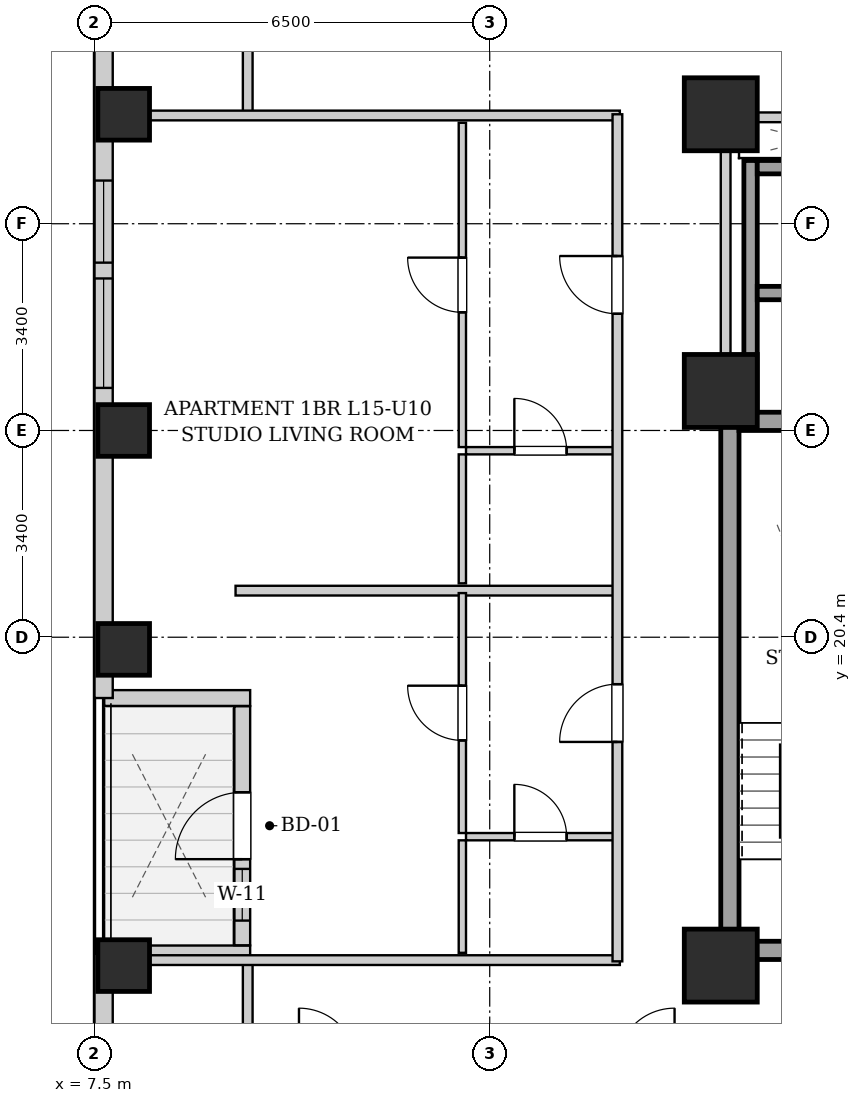
"""IFC4 building model, lengths in metres.
Left out: names, types, materials, properties, quantities, classifications, styles, units other than length and angle.
Written with IfcOpenShell. Run it as: python <this file> out.ifc"""

import sys

from ifc_helpers import new_model, si_unit, direction, frame, frame_2d, origin, origin_2d, place, context, subcontext, project, spatial, rectangle, extrude, element, fill, save


model = new_model("IFC4")
c1 = context("Model", 3, precision=1e-05, world=origin(), true_north=direction((0.0, 1.0)))
c2 = subcontext(c1, "Body", "Model", "MODEL_VIEW")
j1 = project(units=[si_unit("LENGTHUNIT", "METRE"), si_unit("PLANEANGLEUNIT", "RADIAN")], contexts=[c1])
p1 = place(None, origin())
s1 = spatial("IfcSite", under=j1, at=p1, CompositionType="ELEMENT")
p2 = place(p1, origin())
s2 = spatial("IfcBuilding", under=s1, at=p2, CompositionType="ELEMENT")
p3 = place(p2, frame((0.0, 0.0, 57.8)))
s3 = spatial("IfcBuildingStorey", under=s2, at=p3, CompositionType="ELEMENT", Elevation=57.8)
for number, where, z_axis, x_axis in (
    (1, (7.98, 15.0, 0.0), (0.0, 0.0, 1.0), (1.0, 0.0, 0.0)),
    (2, (7.98, 20.2, 0.0), (0.0, 0.0, 1.0), (1.0, 0.0, 0.0)),
    (3, (7.98, 23.8, 0.0), (0.0, 0.0, 1.0), (1.0, 0.0, 0.0)),
    (4, (7.98, 29.0, 0.0), (0.0, 0.0, 1.0), (1.0, 0.0, 0.0)),
):
    element("IfcColumn", number, at=place(p3, frame(where, z_axis=z_axis, x_axis=x_axis)), inside=s3, PredefinedType="COLUMN", context=c2, shape_type="SweptSolid", body=[
        extrude(rectangle(XDim=0.85, YDim=0.85, at=origin_2d()), origin(), (0.0, 0.0, 1.0), 3.2),
    ])
for number, where, z_axis, x_axis in (
    (5, (17.8, 15.0, 0.0), (0.0, 0.0, 1.0), (1.0, 0.0, 0.0)),
    (6, (17.8, 29.0, 0.0), (0.0, 0.0, 1.0), (1.0, 0.0, 0.0)),
    (7, (17.8, 24.45, 0.0), (0.0, 0.0, 1.0), (1.0, 0.0, 0.0)),
):
    element("IfcColumn", number, at=place(p3, frame(where, z_axis=z_axis, x_axis=x_axis)), inside=s3, PredefinedType="COLUMN", context=c2, shape_type="SweptSolid", body=[
        extrude(rectangle(XDim=1.2, YDim=1.2, at=origin_2d()), origin(), (0.0, 0.0, 1.0), 3.2),
    ])
p4 = place(p3, frame((7.65, 2.5, 0.0), z_axis=(0.0, 0.0, 1.0), x_axis=(0.0, 1.0, 0.0)))
e8 = element("IfcWall", 8, at=p4, inside=s3, PredefinedType="SOLIDWALL", context=c2, shape_type="SweptSolid", body=[
    extrude(rectangle(XDim=12.7, YDim=0.3, at=frame_2d((6.35, 0.0))), origin(), (0.0, 0.0, 1.0), 1.975),
])
p5 = place(p4, frame((3.257, 0.0, 0.55)))
e9 = element("IfcOpeningElement", 9, at=p5, cuts=e8, PredefinedType="OPENING", context=c2, shape_type="SweptSolid", body=[
    extrude(rectangle(XDim=1.8, YDim=1.2, at=frame_2d((0.9, 0.6))), frame((0.0, 0.16, 0.0), z_axis=(0.0, -1.0, 0.0), x_axis=(1.0, 0.0, 0.0)), (0.0, 0.0, 1.0), 0.32),
])
p6 = place(p4, frame((1.185, 0.0, 0.55)))
e10 = element("IfcOpeningElement", 10, at=p6, cuts=e8, PredefinedType="OPENING", context=c2, shape_type="SweptSolid", body=[
    extrude(rectangle(XDim=1.35, YDim=1.2, at=frame_2d((0.675, 0.6))), frame((0.0, 0.16, 0.0), z_axis=(0.0, -1.0, 0.0), x_axis=(1.0, 0.0, 0.0)), (0.0, 0.0, 1.0), 0.32),
])
p7 = place(p3, frame((7.66, 15.2, 0.0), z_axis=(0.0, 0.0, 1.0), x_axis=(1.0, 0.0, 0.0)))
e11 = element("IfcWall", 11, at=p7, inside=s3, PredefinedType="SOLIDWALL", context=c2, shape_type="SweptSolid", body=[
    extrude(rectangle(XDim=2.4, YDim=0.26, at=frame_2d((1.2, 0.0))), origin(), (0.0, 0.0, 1.0), 2.94),
])
p8 = place(p3, frame((9.93, 15.334, 0.0), z_axis=(0.0, 0.0, 1.0), x_axis=(0.0, 1.0, 0.0)))
e12 = element("IfcWall", 12, at=p8, inside=s3, PredefinedType="SOLIDWALL", context=c2, shape_type="SweptSolid", body=[
    extrude(rectangle(XDim=3.932, YDim=0.26, at=frame_2d((1.966, 0.0))), origin(), (0.0, 0.0, 1.0), 2.94),
])
p9 = place(p8, frame((1.416, 0.0, 0.0)))
e13 = element("IfcOpeningElement", 13, at=p9, cuts=e12, PredefinedType="OPENING", context=c2, shape_type="SweptSolid", body=[
    extrude(rectangle(XDim=1.1, YDim=2.0, at=frame_2d((0.55, 1.0))), frame((0.0, 0.14, 0.0), z_axis=(0.0, -1.0, 0.0), x_axis=(1.0, 0.0, 0.0)), (0.0, 0.0, 1.0), 0.28),
])
p10 = place(p8, frame((0.406, 0.0, 0.55)))
e14 = element("IfcOpeningElement", 14, at=p10, cuts=e12, PredefinedType="OPENING", context=c2, shape_type="SweptSolid", body=[
    extrude(rectangle(XDim=0.85, YDim=1.2, at=frame_2d((0.425, 0.6))), frame((0.0, 0.14, 0.0), z_axis=(0.0, -1.0, 0.0), x_axis=(1.0, 0.0, 0.0)), (0.0, 0.0, 1.0), 0.28),
])
p11 = place(p3, frame((10.06, 19.4, 0.0), z_axis=(0.0, 0.0, 1.0), x_axis=(-1.0, 0.0, 0.0)))
e15 = element("IfcWall", 15, at=p11, inside=s3, PredefinedType="SOLIDWALL", context=c2, shape_type="SweptSolid", body=[
    extrude(rectangle(XDim=2.4, YDim=0.26, at=frame_2d((1.2, 0.0))), origin(), (0.0, 0.0, 1.0), 2.94),
])
p12 = place(p3, frame((7.65, 19.4, 0.0), z_axis=(0.0, 0.0, 1.0), x_axis=(0.0, 1.0, 0.0)))
e16 = element("IfcWall", 16, at=p12, inside=s3, PredefinedType="SOLIDWALL", context=c2, shape_type="SweptSolid", body=[
    extrude(rectangle(XDim=25.7, YDim=0.3, at=frame_2d((12.85, 0.0))), origin(), (0.0, 0.0, 1.0), 1.975),
])
p13 = place(p12, frame((20.185, 0.0, 0.55)))
e17 = element("IfcOpeningElement", 17, at=p13, cuts=e16, PredefinedType="OPENING", context=c2, shape_type="SweptSolid", body=[
    extrude(rectangle(XDim=1.8, YDim=1.2, at=frame_2d((0.9, 0.6))), frame((0.0, 0.16, 0.0), z_axis=(0.0, -1.0, 0.0), x_axis=(1.0, 0.0, 0.0)), (0.0, 0.0, 1.0), 0.32),
])
p14 = place(p12, frame((14.585, 0.0, 0.55)))
e18 = element("IfcOpeningElement", 18, at=p14, cuts=e16, PredefinedType="OPENING", context=c2, shape_type="SweptSolid", body=[
    extrude(rectangle(XDim=1.35, YDim=1.2, at=frame_2d((0.675, 0.6))), frame((0.0, 0.16, 0.0), z_axis=(0.0, -1.0, 0.0), x_axis=(1.0, 0.0, 0.0)), (0.0, 0.0, 1.0), 0.32),
])
p15 = place(p12, frame((5.1, 0.0, 0.55)))
e19 = element("IfcOpeningElement", 19, at=p15, cuts=e16, PredefinedType="OPENING", context=c2, shape_type="SweptSolid", body=[
    extrude(rectangle(XDim=1.8, YDim=1.2, at=frame_2d((0.9, 0.6))), frame((0.0, 0.16, 0.0), z_axis=(0.0, -1.0, 0.0), x_axis=(1.0, 0.0, 0.0)), (0.0, 0.0, 1.0), 0.32),
])
p16 = place(p12, frame((7.16, 0.0, 0.55)))
e20 = element("IfcOpeningElement", 20, at=p16, cuts=e16, PredefinedType="OPENING", context=c2, shape_type="SweptSolid", body=[
    extrude(rectangle(XDim=1.35, YDim=1.2, at=frame_2d((0.675, 0.6))), frame((0.0, 0.16, 0.0), z_axis=(0.0, -1.0, 0.0), x_axis=(1.0, 0.0, 0.0)), (0.0, 0.0, 1.0), 0.32),
])
p17 = place(p3, frame((17.95, 15.1, 0.0), z_axis=(0.0, 0.0, 1.0), x_axis=(0.0, 1.0, 0.0)))
e21 = element("IfcWall", 21, at=p17, inside=s3, PredefinedType="SHEAR", context=c2, shape_type="SweptSolid", body=[
    extrude(rectangle(XDim=9.0, YDim=0.3, at=frame_2d((4.5, 0.0))), origin(), (0.0, 0.0, 1.0), 2.94),
])
p18 = place(p3, frame((18.1, 23.95, 0.0), z_axis=(0.0, 0.0, 1.0), x_axis=(1.0, 0.0, 0.0)))
e22 = element("IfcWall", 22, at=p18, inside=s3, PredefinedType="SHEAR", context=c2, shape_type="SweptSolid", body=[
    extrude(rectangle(XDim=2.85, YDim=0.3, at=frame_2d((1.425, 0.0))), origin(), (0.0, 0.0, 1.0), 2.94),
])
p19 = place(p3, frame((18.1, 15.25, 0.0), z_axis=(0.0, 0.0, 1.0), x_axis=(1.0, 0.0, 0.0)))
e23 = element("IfcWall", 23, at=p19, inside=s3, PredefinedType="SHEAR", context=c2, shape_type="SweptSolid", body=[
    extrude(rectangle(XDim=2.85, YDim=0.3, at=frame_2d((1.425, 0.0))), origin(), (0.0, 0.0, 1.0), 2.94),
])
p20 = place(p19, frame((0.86, 0.0, 0.0)))
e24 = element("IfcOpeningElement", 24, at=p20, cuts=e23, PredefinedType="OPENING", context=c2, shape_type="SweptSolid", body=[
    extrude(rectangle(XDim=1.1, YDim=2.05, at=frame_2d((0.55, 1.025))), frame((0.0, 0.16, 0.0), z_axis=(0.0, -1.0, 0.0), x_axis=(1.0, 0.0, 0.0)), (0.0, 0.0, 1.0), 0.32),
])
p21 = place(p3, frame((18.29, 24.1, 0.0), z_axis=(0.0, 0.0, 1.0), x_axis=(0.0, 1.0, 0.0)))
e25 = element("IfcWall", 25, at=p21, inside=s3, PredefinedType="SHEAR", context=c2, shape_type="SweptSolid", body=[
    extrude(rectangle(XDim=4.14, YDim=0.22, at=frame_2d((2.07, 0.0))), origin(), (0.0, 0.0, 1.0), 2.94),
])
for number, where, z_axis, x_axis in (
    (26, (18.4, 26.06, 0.0), (0.0, 0.0, 1.0), (1.0, 0.0, 0.0)),
    (27, (18.4, 28.13, 0.0), (0.0, 0.0, 1.0), (1.0, 0.0, 0.0)),
):
    element("IfcWall", number, at=place(p3, frame(where, z_axis=z_axis, x_axis=x_axis)), inside=s3, PredefinedType="SHEAR", context=c2, shape_type="SweptSolid", body=[
        extrude(rectangle(XDim=1.9, YDim=0.22, at=frame_2d((0.95, 0.0))), origin(), (0.0, 0.0, 1.0), 2.94),
    ])
p22 = place(p3, frame((17.88, 24.12, 0.0), z_axis=(0.0, 0.0, 1.0), x_axis=(0.0, 1.0, 0.0)))
e28 = element("IfcWall", 28, at=p22, inside=s3, PredefinedType="PARTITIONING", context=c2, shape_type="SweptSolid", body=[
    extrude(rectangle(XDim=4.76, YDim=0.16, at=frame_2d((2.38, 0.0))), origin(), (0.0, 0.0, 1.0), 2.275),
])
p23 = place(p3, frame((17.96, 28.95, 0.0), z_axis=(0.0, 0.0, 1.0), x_axis=(1.0, 0.0, 0.0)))
e29 = element("IfcWall", 29, at=p23, inside=s3, PredefinedType="PARTITIONING", context=c2, shape_type="SweptSolid", body=[
    extrude(rectangle(XDim=4.29, YDim=0.16, at=frame_2d((2.145, 0.0))), origin(), (0.0, 0.0, 1.0), 2.232),
])
p24 = place(p23, frame((1.57, 0.0, 0.0)))
e30 = element("IfcOpeningElement", 30, at=p24, cuts=e29, PredefinedType="OPENING", context=c2, shape_type="SweptSolid", body=[
    extrude(rectangle(XDim=0.86, YDim=2.05, at=frame_2d((0.43, 1.025))), frame((0.0, 0.09, 0.0), z_axis=(0.0, -1.0, 0.0), x_axis=(1.0, 0.0, 0.0)), (0.0, 0.0, 1.0), 0.18),
])
for number, where, z_axis, x_axis in (
    (31, (10.02, 13.35, 0.0), (0.0, 0.0, 1.0), (0.0, 1.0, 0.0)),
    (32, (10.02, 28.98, 0.0), (0.0, 0.0, 1.0), (0.0, 1.0, 0.0)),
):
    element("IfcWall", number, at=place(p3, frame(where, z_axis=z_axis, x_axis=x_axis)), inside=s3, PredefinedType="PARTITIONING", context=c2, shape_type="SweptSolid", body=[
        extrude(rectangle(XDim=1.74, YDim=0.16, at=frame_2d((0.87, 0.0))), origin(), (0.0, 0.0, 1.0), 2.94),
    ])
for number, where, z_axis, x_axis in (
    (33, (7.78, 15.09, 0.0), (0.0, 0.0, 1.0), (1.0, 0.0, 0.0)),
    (34, (7.78, 28.98, 0.0), (0.0, 0.0, 1.0), (1.0, 0.0, 0.0)),
):
    element("IfcWall", number, at=place(p3, frame(where, z_axis=z_axis, x_axis=x_axis)), inside=s3, PredefinedType="PARTITIONING", context=c2, shape_type="SweptSolid", body=[
        extrude(rectangle(XDim=8.36, YDim=0.16, at=frame_2d((4.18, 0.0))), origin(), (0.0, 0.0, 1.0), 2.232),
    ])
p25 = place(p3, frame((9.82, 21.166, 0.0), z_axis=(0.0, 0.0, 1.0), x_axis=(1.0, 0.0, 0.0)))
e35 = element("IfcWall", 35, at=p25, inside=s3, PredefinedType="PARTITIONING", context=c2, shape_type="SweptSolid", body=[
    extrude(rectangle(XDim=6.24, YDim=0.16, at=frame_2d((3.12, 0.0))), origin(), (0.0, 0.0, 1.0), 2.94),
])
p26 = place(p3, frame((13.61, 17.12, 0.0), z_axis=(0.0, 0.0, 1.0), x_axis=(1.0, 0.0, 0.0)))
e36 = element("IfcWall", 36, at=p26, inside=s3, PredefinedType="PARTITIONING", context=c2, shape_type="SweptSolid", body=[
    extrude(rectangle(XDim=2.45, YDim=0.12, at=frame_2d((1.225, 0.0))), origin(), (0.0, 0.0, 1.0), 2.94),
])
p27 = place(p26, frame((0.795, 0.0, 0.0)))
e37 = element("IfcOpeningElement", 37, at=p27, cuts=e36, PredefinedType="OPENING", context=c2, shape_type="SweptSolid", body=[
    extrude(rectangle(XDim=0.86, YDim=2.05, at=frame_2d((0.43, 1.025))), frame((0.0, 0.07, 0.0), z_axis=(0.0, -1.0, 0.0), x_axis=(1.0, 0.0, 0.0)), (0.0, 0.0, 1.0), 0.14),
])
p28 = place(p3, frame((13.55, 15.21, 0.0), z_axis=(0.0, 0.0, 1.0), x_axis=(0.0, 1.0, 0.0)))
e38 = element("IfcWall", 38, at=p28, inside=s3, PredefinedType="PARTITIONING", context=c2, shape_type="SweptSolid", body=[
    extrude(rectangle(XDim=1.85, YDim=0.12, at=frame_2d((0.925, 0.0))), origin(), (0.0, 0.0, 1.0), 2.94),
])
p29 = place(p3, frame((13.55, 17.18, 0.0), z_axis=(0.0, 0.0, 1.0), x_axis=(0.0, 1.0, 0.0)))
e39 = element("IfcWall", 39, at=p29, inside=s3, PredefinedType="PARTITIONING", context=c2, shape_type="SweptSolid", body=[
    extrude(rectangle(XDim=3.946, YDim=0.12, at=frame_2d((1.973, 0.0))), origin(), (0.0, 0.0, 1.0), 2.94),
])
p30 = place(p29, frame((1.523, 0.0, 0.0)))
e40 = element("IfcOpeningElement", 40, at=p30, cuts=e39, PredefinedType="OPENING", context=c2, shape_type="SweptSolid", body=[
    extrude(rectangle(XDim=0.9, YDim=2.05, at=frame_2d((0.45, 1.025))), frame((0.0, 0.07, 0.0), z_axis=(0.0, -1.0, 0.0), x_axis=(1.0, 0.0, 0.0)), (0.0, 0.0, 1.0), 0.14),
])
p31 = place(p3, frame((13.61, 23.467, 0.0), z_axis=(0.0, 0.0, 1.0), x_axis=(1.0, 0.0, 0.0)))
e41 = element("IfcWall", 41, at=p31, inside=s3, PredefinedType="PARTITIONING", context=c2, shape_type="SweptSolid", body=[
    extrude(rectangle(XDim=2.45, YDim=0.12, at=frame_2d((1.225, 0.0))), origin(), (0.0, 0.0, 1.0), 2.94),
])
p32 = place(p31, frame((0.795, 0.0, 0.0)))
e42 = element("IfcOpeningElement", 42, at=p32, cuts=e41, PredefinedType="OPENING", context=c2, shape_type="SweptSolid", body=[
    extrude(rectangle(XDim=0.86, YDim=2.05, at=frame_2d((0.43, 1.025))), frame((0.0, 0.07, 0.0), z_axis=(0.0, -1.0, 0.0), x_axis=(1.0, 0.0, 0.0)), (0.0, 0.0, 1.0), 0.14),
])
p33 = place(p3, frame((13.55, 21.286, 0.0), z_axis=(0.0, 0.0, 1.0), x_axis=(0.0, 1.0, 0.0)))
e43 = element("IfcWall", 43, at=p33, inside=s3, PredefinedType="PARTITIONING", context=c2, shape_type="SweptSolid", body=[
    extrude(rectangle(XDim=2.121, YDim=0.12, at=frame_2d((1.061, 0.0))), origin(), (0.0, 0.0, 1.0), 2.94),
])
p34 = place(p3, frame((13.55, 23.527, 0.0), z_axis=(0.0, 0.0, 1.0), x_axis=(0.0, 1.0, 0.0)))
e44 = element("IfcWall", 44, at=p34, inside=s3, PredefinedType="PARTITIONING", context=c2, shape_type="SweptSolid", body=[
    extrude(rectangle(XDim=5.333, YDim=0.12, at=frame_2d((2.667, 0.0))), origin(), (0.0, 0.0, 1.0), 2.94),
])
p35 = place(p34, frame((2.216, 0.0, 0.0)))
e45 = element("IfcOpeningElement", 45, at=p35, cuts=e44, PredefinedType="OPENING", context=c2, shape_type="SweptSolid", body=[
    extrude(rectangle(XDim=0.9, YDim=2.05, at=frame_2d((0.45, 1.025))), frame((0.0, 0.07, 0.0), z_axis=(0.0, -1.0, 0.0), x_axis=(1.0, 0.0, 0.0)), (0.0, 0.0, 1.0), 0.14),
])
p36 = place(p3, frame((16.1, 15.07, 0.0), z_axis=(0.0, 0.0, 1.0), x_axis=(0.0, 1.0, 0.0)))
e46 = element("IfcWall", 46, at=p36, inside=s3, PredefinedType="PARTITIONING", context=c2, shape_type="SweptSolid", body=[
    extrude(rectangle(XDim=13.93, YDim=0.16, at=frame_2d((6.965, 0.0))), origin(), (0.0, 0.0, 1.0), 2.94),
])
p37 = place(p36, frame((3.608, 0.0, 0.0)))
e47 = element("IfcOpeningElement", 47, at=p37, cuts=e46, PredefinedType="OPENING", context=c2, shape_type="SweptSolid", body=[
    extrude(rectangle(XDim=0.95, YDim=2.1, at=frame_2d((0.475, 1.05))), frame((0.0, 0.09, 0.0), z_axis=(0.0, -1.0, 0.0), x_axis=(1.0, 0.0, 0.0)), (0.0, 0.0, 1.0), 0.18),
])
p38 = place(p36, frame((10.649, 0.0, 0.0)))
e48 = element("IfcOpeningElement", 48, at=p38, cuts=e46, PredefinedType="OPENING", context=c2, shape_type="SweptSolid", body=[
    extrude(rectangle(XDim=0.95, YDim=2.1, at=frame_2d((0.475, 1.05))), frame((0.0, 0.09, 0.0), z_axis=(0.0, -1.0, 0.0), x_axis=(1.0, 0.0, 0.0)), (0.0, 0.0, 1.0), 0.18),
])
p39 = place(p27, origin())
e49 = element("IfcDoor", 49, at=p39, inside=s3, OperationType="SINGLE_SWING_LEFT", PredefinedType="DOOR", context=c2, shape_type="SweptSolid", body=[
    extrude(rectangle(XDim=0.86, YDim=2.05, at=frame_2d((0.43, 1.025))), frame((0.0, 0.025, 0.0), z_axis=(0.0, -1.0, 0.0), x_axis=(1.0, 0.0, 0.0)), (0.0, 0.0, 1.0), 0.05),
])
fill(e37, e49)
p40 = place(p30, origin())
e50 = element("IfcDoor", 50, at=p40, inside=s3, OperationType="SINGLE_SWING_RIGHT", PredefinedType="DOOR", context=c2, shape_type="SweptSolid", body=[
    extrude(rectangle(XDim=0.9, YDim=2.05, at=frame_2d((0.45, 1.025))), frame((0.0, 0.025, 0.0), z_axis=(0.0, -1.0, 0.0), x_axis=(1.0, 0.0, 0.0)), (0.0, 0.0, 1.0), 0.05),
])
fill(e40, e50)
p41 = place(p32, origin())
e51 = element("IfcDoor", 51, at=p41, inside=s3, OperationType="SINGLE_SWING_LEFT", PredefinedType="DOOR", context=c2, shape_type="SweptSolid", body=[
    extrude(rectangle(XDim=0.86, YDim=2.05, at=frame_2d((0.43, 1.025))), frame((0.0, 0.025, 0.0), z_axis=(0.0, -1.0, 0.0), x_axis=(1.0, 0.0, 0.0)), (0.0, 0.0, 1.0), 0.05),
])
fill(e42, e51)
p42 = place(p35, origin())
e52 = element("IfcDoor", 52, at=p42, inside=s3, OperationType="SINGLE_SWING_RIGHT", PredefinedType="DOOR", context=c2, shape_type="SweptSolid", body=[
    extrude(rectangle(XDim=0.9, YDim=2.05, at=frame_2d((0.45, 1.025))), frame((0.0, 0.025, 0.0), z_axis=(0.0, -1.0, 0.0), x_axis=(1.0, 0.0, 0.0)), (0.0, 0.0, 1.0), 0.05),
])
fill(e45, e52)
p43 = place(p37, origin())
e53 = element("IfcDoor", 53, at=p43, inside=s3, OperationType="SINGLE_SWING_LEFT", PredefinedType="DOOR", context=c2, shape_type="SweptSolid", body=[
    extrude(rectangle(XDim=0.95, YDim=2.1, at=frame_2d((0.475, 1.05))), frame((0.0, 0.025, 0.0), z_axis=(0.0, -1.0, 0.0), x_axis=(1.0, 0.0, 0.0)), (0.0, 0.0, 1.0), 0.05),
])
fill(e47, e53)
p44 = place(p38, origin())
e54 = element("IfcDoor", 54, at=p44, inside=s3, OperationType="SINGLE_SWING_RIGHT", PredefinedType="DOOR", context=c2, shape_type="SweptSolid", body=[
    extrude(rectangle(XDim=0.95, YDim=2.1, at=frame_2d((0.475, 1.05))), frame((0.0, 0.025, 0.0), z_axis=(0.0, -1.0, 0.0), x_axis=(1.0, 0.0, 0.0)), (0.0, 0.0, 1.0), 0.05),
])
fill(e48, e54)
p45 = place(p9, origin())
e55 = element("IfcDoor", 55, at=p45, inside=s3, OperationType="SINGLE_SWING_LEFT", PredefinedType="DOOR", context=c2, shape_type="SweptSolid", body=[
    extrude(rectangle(XDim=1.1, YDim=2.0, at=frame_2d((0.55, 1.0))), frame((0.0, 0.025, 0.0), z_axis=(0.0, -1.0, 0.0), x_axis=(1.0, 0.0, 0.0)), (0.0, 0.0, 1.0), 0.05),
])
fill(e13, e55)
p46 = place(p10, origin())
e56 = element("IfcWindow", 56, at=p46, inside=s3, PartitioningType="SINGLE_PANEL", PredefinedType="WINDOW", context=c2, shape_type="SweptSolid", body=[
    extrude(rectangle(XDim=0.85, YDim=1.2, at=frame_2d((0.425, 0.6))), frame((0.0, 0.03, 0.0), z_axis=(0.0, -1.0, 0.0), x_axis=(1.0, 0.0, 0.0)), (0.0, 0.0, 1.0), 0.06),
])
fill(e14, e56)
p47 = place(p15, origin())
e57 = element("IfcWindow", 57, at=p47, inside=s3, PartitioningType="DOUBLE_PANEL_VERTICAL", PredefinedType="WINDOW", context=c2, shape_type="SweptSolid", body=[
    extrude(rectangle(XDim=1.8, YDim=1.2, at=frame_2d((0.9, 0.6))), frame((0.0, 0.03, 0.0), z_axis=(0.0, -1.0, 0.0), x_axis=(1.0, 0.0, 0.0)), (0.0, 0.0, 1.0), 0.06),
])
fill(e19, e57)
p48 = place(p16, origin())
e58 = element("IfcWindow", 58, at=p48, inside=s3, PartitioningType="SINGLE_PANEL", PredefinedType="WINDOW", context=c2, shape_type="SweptSolid", body=[
    extrude(rectangle(XDim=1.35, YDim=1.2, at=frame_2d((0.675, 0.6))), frame((0.0, 0.03, 0.0), z_axis=(0.0, -1.0, 0.0), x_axis=(1.0, 0.0, 0.0)), (0.0, 0.0, 1.0), 0.06),
])
fill(e20, e58)
save(model, sys.argv[1])
